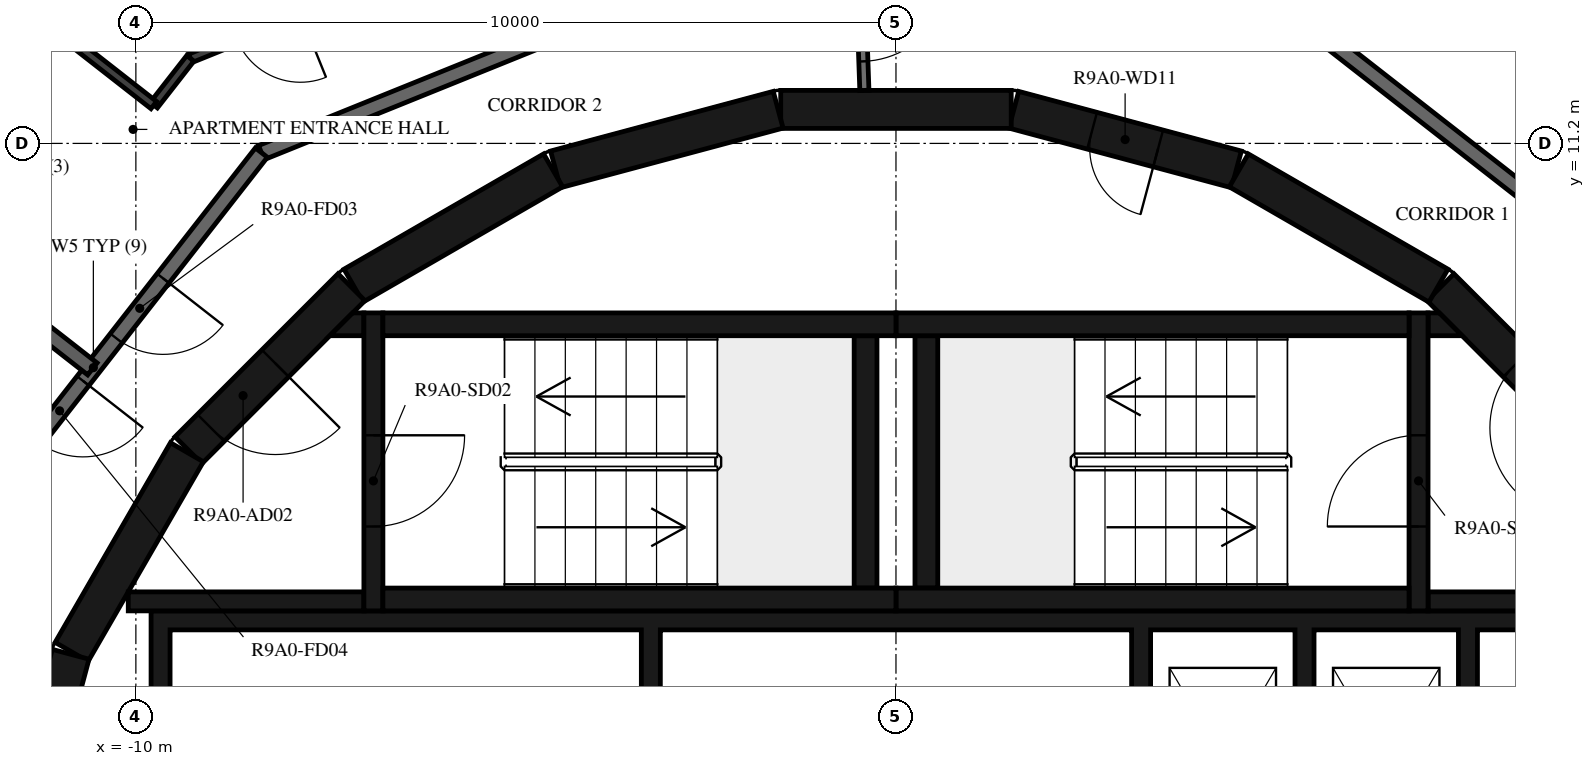
"""IFC4 building model, lengths in metres.
Left out: names, types, materials, properties, quantities, classifications, styles, units other than length and angle.
Written with IfcOpenShell. Run it as: python <this file> out.ifc"""

import sys

from ifc_helpers import new_model, si_unit, direction, frame, frame_2d, origin, place, context, subcontext, project, spatial, polyline, rectangle, outline, extrude, element, fill, save


model = new_model("IFC4")
c1 = context("Model", 3, precision=1e-05, world=origin(), true_north=direction((0.0, 1.0)))
c2 = subcontext(c1, "Body", "Model", "MODEL_VIEW")
j1 = project(units=[si_unit("LENGTHUNIT", "METRE"), si_unit("PLANEANGLEUNIT", "RADIAN")], contexts=[c1])
p1 = place(None, origin())
s1 = spatial("IfcSite", under=j1, at=p1, CompositionType="ELEMENT")
p2 = place(p1, origin())
s2 = spatial("IfcBuilding", under=s1, at=p2, CompositionType="ELEMENT")
p3 = place(p2, frame((0.0, 0.0, 340.0)))
s3 = spatial("IfcBuildingStorey", under=s2, at=p3, CompositionType="ELEMENT", Elevation=340.0)
p4 = place(p3, frame((9.308, 7.164, 0.0), z_axis=(0.0, 0.0, 1.0), x_axis=(-0.707106781187, 0.707106781187, 0.0)))
e1 = element("IfcWall", 1, at=p4, inside=s3, PredefinedType="SHEAR", context=c2, shape_type="SweptSolid", body=[
    extrude(rectangle(XDim=3.032, YDim=0.5, at=frame_2d((1.516, 0.0))), origin(), (0.0, 0.0, 1.0), 3.12),
])
p5 = place(p4, frame((0.416, 0.0, 0.0)))
e2 = element("IfcOpeningElement", 2, at=p5, cuts=e1, PredefinedType="OPENING", context=c2, shape_type="SweptSolid", body=[
    extrude(rectangle(XDim=1.2, YDim=2.1, at=frame_2d((0.6, 1.05))), frame((0.0, 0.26, 0.0), z_axis=(0.0, -1.0, 0.0), x_axis=(1.0, 0.0, 0.0)), (0.0, 0.0, 1.0), 0.52),
])
p6 = place(p3, frame((7.137, 9.329, 0.0), z_axis=(0.0, 0.0, 1.0), x_axis=(-0.865975092491, 0.500087131594, 0.0)))
e3 = element("IfcWall", 3, at=p6, inside=s3, PredefinedType="SHEAR", context=c2, shape_type="SweptSolid", body=[
    extrude(rectangle(XDim=3.033, YDim=0.5, at=frame_2d((1.516, 0.0))), origin(), (0.0, 0.0, 1.0), 3.12),
])
p7 = place(p3, frame((4.479, 10.858, 0.0), z_axis=(0.0, 0.0, 1.0), x_axis=(-0.965948410781, 0.258734743916, 0.0)))
e4 = element("IfcWall", 4, at=p7, inside=s3, PredefinedType="SHEAR", context=c2, shape_type="SweptSolid", body=[
    extrude(rectangle(XDim=3.033, YDim=0.5, at=frame_2d((1.516, 0.0))), origin(), (0.0, 0.0, 1.0), 3.12),
])
p8 = place(p7, frame((1.066, 0.0, 0.0)))
e5 = element("IfcOpeningElement", 5, at=p8, cuts=e4, PredefinedType="OPENING", context=c2, shape_type="SweptSolid", body=[
    extrude(rectangle(XDim=0.9, YDim=2.1, at=frame_2d((0.45, 1.05))), frame((0.0, 0.26, 0.0), z_axis=(0.0, -1.0, 0.0), x_axis=(1.0, 0.0, 0.0)), (0.0, 0.0, 1.0), 0.52),
])
for number, where, z_axis, x_axis in (
    (6, (1.516, 11.647, 0.0), (0.0, 0.0, 1.0), (-1.0, 0.0, 0.0)),
    (7, (-1.55, 11.643, 0.0), (0.0, 0.0, 1.0), (-0.966, -0.259, 0.0)),
    (8, (-4.51, 10.845, 0.0), (0.0, 0.0, 1.0), (-0.866, -0.5, 0.0)),
):
    element("IfcWall", number, at=place(p3, frame(where, z_axis=z_axis, x_axis=x_axis)), inside=s3, PredefinedType="SHEAR", context=c2, shape_type="SweptSolid", body=[
        extrude(rectangle(XDim=3.033, YDim=0.5, at=frame_2d((1.516, 0.0))), origin(), (0.0, 0.0, 1.0), 3.12),
    ])
p9 = place(p3, frame((-7.164, 9.308, 0.0), z_axis=(0.0, 0.0, 1.0), x_axis=(-0.707106781187, -0.707106781187, 0.0)))
e9 = element("IfcWall", 9, at=p9, inside=s3, PredefinedType="SHEAR", context=c2, shape_type="SweptSolid", body=[
    extrude(rectangle(XDim=3.032, YDim=0.5, at=frame_2d((1.516, 0.0))), origin(), (0.0, 0.0, 1.0), 3.12),
])
p10 = place(p9, frame((1.416, 0.0, 0.0)))
e10 = element("IfcOpeningElement", 10, at=p10, cuts=e9, PredefinedType="OPENING", context=c2, shape_type="SweptSolid", body=[
    extrude(rectangle(XDim=1.2, YDim=2.1, at=frame_2d((0.6, 1.05))), frame((0.0, 0.26, 0.0), z_axis=(0.0, -1.0, 0.0), x_axis=(1.0, 0.0, 0.0)), (0.0, 0.0, 1.0), 0.52),
])
for number, where, z_axis, x_axis in (
    (11, (-9.329, 7.137, 0.0), (0.0, 0.0, 1.0), (-0.5, -0.866, 0.0)),
    (12, (-10.858, 4.479, 0.0), (0.0, 0.0, 1.0), (-0.259, -0.966, 0.0)),
):
    element("IfcWall", number, at=place(p3, frame(where, z_axis=z_axis, x_axis=x_axis)), inside=s3, PredefinedType="SHEAR", context=c2, shape_type="SweptSolid", body=[
        extrude(rectangle(XDim=3.033, YDim=0.5, at=frame_2d((1.516, 0.0))), origin(), (0.0, 0.0, 1.0), 3.12),
    ])
for number, where, z_axis, x_axis in (
    (13, (0.0, 5.2, 0.0), (0.0, 0.0, 1.0), (1.0, 0.0, 0.0)),
    (14, (0.0, 8.82, 0.0), (0.0, 0.0, 1.0), (1.0, 0.0, 0.0)),
):
    element("IfcWall", number, at=place(p3, frame(where, z_axis=z_axis, x_axis=x_axis)), inside=s3, PredefinedType="SHEAR", context=c2, shape_type="SweptSolid", body=[
        extrude(rectangle(XDim=6.75, YDim=0.3, at=frame_2d((3.375, 0.0))), origin(), (0.0, 0.0, 1.0), 3.12),
    ])
p11 = place(p3, frame((0.4, 5.35, 0.0), z_axis=(0.0, 0.0, 1.0), x_axis=(0.0, 1.0, 0.0)))
e15 = element("IfcWall", 15, at=p11, inside=s3, PredefinedType="SHEAR", context=c2, shape_type="SweptSolid", body=[
    extrude(rectangle(XDim=3.32, YDim=0.3, at=frame_2d((1.66, 0.0))), origin(), (0.0, 0.0, 1.0), 3.12),
])
p12 = place(p3, frame((6.875, 5.05, 0.0), z_axis=(0.0, 0.0, 1.0), x_axis=(0.0, 1.0, 0.0)))
e16 = element("IfcWall", 16, at=p12, inside=s3, PredefinedType="SHEAR", context=c2, shape_type="SweptSolid", body=[
    extrude(rectangle(XDim=3.92, YDim=0.25, at=frame_2d((1.96, 0.0))), origin(), (0.0, 0.0, 1.0), 3.12),
])
p13 = place(p12, frame((1.11, 0.0, 0.0)))
e17 = element("IfcOpeningElement", 17, at=p13, cuts=e16, PredefinedType="OPENING", context=c2, shape_type="SweptSolid", body=[
    extrude(rectangle(XDim=1.2, YDim=2.1, at=frame_2d((0.6, 1.05))), frame((0.0, 0.135, 0.0), z_axis=(0.0, -1.0, 0.0), x_axis=(1.0, 0.0, 0.0)), (0.0, 0.0, 1.0), 0.27),
])
p14 = place(p3, frame((7.0, 5.175, 0.0), z_axis=(0.0, 0.0, 1.0), x_axis=(1.0, 0.0, 0.0)))
e18 = element("IfcWall", 18, at=p14, inside=s3, PredefinedType="SHEAR", context=c2, shape_type="SweptSolid", body=[
    extrude(rectangle(XDim=3.1, YDim=0.25, at=frame_2d((1.55, 0.0))), origin(), (0.0, 0.0, 1.0), 3.12),
])
p15 = place(p3, origin())
e19 = element("IfcWall", 19, at=p15, inside=s3, PredefinedType="SHEAR", context=c2, shape_type="SweptSolid", body=[
    extrude(outline(polyline([(7.448, 8.67), (7.0, 8.67), (7.0, 8.97), (7.148, 8.97), (7.448, 8.67)])), origin(), (0.0, 0.0, 1.0), 3.12),
])
for number, where, z_axis, x_axis in (
    (20, (-6.75, 5.2, 0.0), (0.0, 0.0, 1.0), (1.0, 0.0, 0.0)),
    (21, (-6.75, 8.82, 0.0), (0.0, 0.0, 1.0), (1.0, 0.0, 0.0)),
):
    element("IfcWall", number, at=place(p3, frame(where, z_axis=z_axis, x_axis=x_axis)), inside=s3, PredefinedType="SHEAR", context=c2, shape_type="SweptSolid", body=[
        extrude(rectangle(XDim=6.75, YDim=0.3, at=frame_2d((3.375, 0.0))), origin(), (0.0, 0.0, 1.0), 3.12),
    ])
p16 = place(p3, frame((-0.4, 5.35, 0.0), z_axis=(0.0, 0.0, 1.0), x_axis=(0.0, 1.0, 0.0)))
e22 = element("IfcWall", 22, at=p16, inside=s3, PredefinedType="SHEAR", context=c2, shape_type="SweptSolid", body=[
    extrude(rectangle(XDim=3.32, YDim=0.3, at=frame_2d((1.66, 0.0))), origin(), (0.0, 0.0, 1.0), 3.12),
])
p17 = place(p3, frame((-6.875, 8.97, 0.0), z_axis=(0.0, 0.0, 1.0), x_axis=(0.0, -1.0, 0.0)))
e23 = element("IfcWall", 23, at=p17, inside=s3, PredefinedType="SHEAR", context=c2, shape_type="SweptSolid", body=[
    extrude(rectangle(XDim=3.92, YDim=0.25, at=frame_2d((1.96, 0.0))), origin(), (0.0, 0.0, 1.0), 3.12),
])
p18 = place(p17, frame((1.61, 0.0, 0.0)))
e24 = element("IfcOpeningElement", 24, at=p18, cuts=e23, PredefinedType="OPENING", context=c2, shape_type="SweptSolid", body=[
    extrude(rectangle(XDim=1.2, YDim=2.1, at=frame_2d((0.6, 1.05))), frame((0.0, 0.135, 0.0), z_axis=(0.0, -1.0, 0.0), x_axis=(1.0, 0.0, 0.0)), (0.0, 0.0, 1.0), 0.27),
])
p19 = place(p3, frame((-7.0, 5.175, 0.0), z_axis=(0.0, 0.0, 1.0), x_axis=(-1.0, 0.0, 0.0)))
e25 = element("IfcWall", 25, at=p19, inside=s3, PredefinedType="SHEAR", context=c2, shape_type="SweptSolid", body=[
    extrude(rectangle(XDim=3.1, YDim=0.25, at=frame_2d((1.55, 0.0))), origin(), (0.0, 0.0, 1.0), 3.12),
])
p20 = place(p3, origin())
e26 = element("IfcWall", 26, at=p20, inside=s3, PredefinedType="SHEAR", context=c2, shape_type="SweptSolid", body=[
    extrude(outline(polyline([(-7.148, 8.97), (-7.0, 8.97), (-7.0, 8.67), (-7.448, 8.67), (-7.148, 8.97)])), origin(), (0.0, 0.0, 1.0), 3.12),
])
p21 = place(p3, origin())
e27 = element("IfcWall", 27, at=p21, inside=s3, PredefinedType="SHEAR", context=c2, shape_type="SweptSolid", body=[
    extrude(outline(polyline([(-9.8, 1.9), (-9.55, 1.9), (-9.55, 4.8), (-3.35, 4.8), (-3.35, 1.9), (-3.1, 1.9), (-3.1, 4.8), (3.1, 4.8), (3.1, 1.9), (3.35, 1.9), (3.35, 4.8), (5.25, 4.8), (5.25, 1.9), (5.5, 1.9), (5.5, 4.8), (7.4, 4.8), (7.4, 1.9), (7.65, 1.9), (7.65, 4.8), (9.55, 4.8), (9.55, 1.9), (9.8, 1.9), (9.8, 4.8), (9.8, 5.05), (-9.8, 5.05), (-9.8, 4.8), (-9.8, 1.9)])), origin(), (0.0, 0.0, 1.0), 3.12),
])
p22 = place(p3, frame((-0.475, 13.598, 0.0), z_axis=(0.0, 0.0, 1.0), x_axis=(0.034852521429, -0.999392466326, 0.0)))
e28 = element("IfcWall", 28, at=p22, inside=s3, PredefinedType="PARTITIONING", context=c2, shape_type="SweptSolid", body=[
    extrude(rectangle(XDim=1.702, YDim=0.12, at=frame_2d((0.851, 0.0))), origin(), (0.0, 0.0, 1.0), 3.12),
])
p23 = place(p22, frame((0.12, 0.0, 0.0)))
e29 = element("IfcOpeningElement", 29, at=p23, cuts=e28, PredefinedType="OPENING", context=c2, shape_type="SweptSolid", body=[
    extrude(rectangle(XDim=1.2, YDim=2.1, at=frame_2d((0.6, 1.05))), frame((0.0, 0.07, 0.0), z_axis=(0.0, -1.0, 0.0), x_axis=(1.0, 0.0, 0.0)), (0.0, 0.0, 1.0), 0.14),
])
p24 = place(p3, frame((11.079, 8.349, 0.0), z_axis=(0.0, 0.0, 1.0), x_axis=(-0.78800478687, 0.615669112324, 0.0)))
e30 = element("IfcWall", 30, at=p24, inside=s3, PredefinedType="STANDARD", context=c2, shape_type="SweptSolid", body=[
    extrude(rectangle(XDim=7.181, YDim=0.2, at=frame_2d((3.591, 0.0))), origin(), (0.0, 0.0, 1.0), 3.12),
])
p25 = place(p24, frame((1.0, 0.0, 0.0)))
e31 = element("IfcOpeningElement", 31, at=p25, cuts=e30, PredefinedType="OPENING", context=c2, shape_type="SweptSolid", body=[
    extrude(rectangle(XDim=1.0, YDim=2.1, at=frame_2d((0.5, 1.05))), frame((0.0, 0.11, 0.0), z_axis=(0.0, -1.0, 0.0), x_axis=(1.0, 0.0, 0.0)), (0.0, 0.0, 1.0), 0.22),
])
p26 = place(p3, frame((-1.691, 13.769, 0.0), z_axis=(0.0, 0.0, 1.0), x_axis=(-0.92717916932, -0.374618189599, 0.0)))
e32 = element("IfcWall", 32, at=p26, inside=s3, PredefinedType="STANDARD", context=c2, shape_type="SweptSolid", body=[
    extrude(rectangle(XDim=7.181, YDim=0.2, at=frame_2d((3.591, 0.0))), origin(), (0.0, 0.0, 1.0), 3.12),
])
p27 = place(p3, frame((-8.349, 11.079, 0.0), z_axis=(0.0, 0.0, 1.0), x_axis=(-0.615669112324, -0.78800478687, 0.0)))
e33 = element("IfcWall", 33, at=p27, inside=s3, PredefinedType="STANDARD", context=c2, shape_type="SweptSolid", body=[
    extrude(rectangle(XDim=7.181, YDim=0.2, at=frame_2d((3.591, 0.0))), origin(), (0.0, 0.0, 1.0), 3.12),
])
p28 = place(p27, frame((2.1, 0.0, 0.0)))
e34 = element("IfcOpeningElement", 34, at=p28, cuts=e33, PredefinedType="OPENING", context=c2, shape_type="SweptSolid", body=[
    extrude(rectangle(XDim=1.0, YDim=2.1, at=frame_2d((0.5, 1.05))), frame((0.0, 0.11, 0.0), z_axis=(0.0, -1.0, 0.0), x_axis=(1.0, 0.0, 0.0)), (0.0, 0.0, 1.0), 0.22),
])
p29 = place(p27, frame((3.811, 0.0, 0.0)))
e35 = element("IfcOpeningElement", 35, at=p29, cuts=e33, PredefinedType="OPENING", context=c2, shape_type="SweptSolid", body=[
    extrude(rectangle(XDim=1.0, YDim=2.1, at=frame_2d((0.5, 1.05))), frame((0.0, 0.11, 0.0), z_axis=(0.0, -1.0, 0.0), x_axis=(1.0, 0.0, 0.0)), (0.0, 0.0, 1.0), 0.22),
])
p30 = place(p3, frame((-12.479, 9.723, 0.0), z_axis=(0.0, 0.0, 1.0), x_axis=(0.788030490991, -0.615636211792, 0.0)))
e36 = element("IfcWall", 36, at=p30, inside=s3, PredefinedType="STANDARD", context=c2, shape_type="SweptSolid", body=[
    extrude(rectangle(XDim=2.42, YDim=0.2, at=frame_2d((1.21, 0.0))), origin(), (0.0, 0.0, 1.0), 3.12),
])
p31 = place(p3, frame((12.319, 9.283, 0.0), z_axis=(0.0, 0.0, 1.0), x_axis=(-0.788000268464, 0.61567489546, 0.0)))
e37 = element("IfcWall", 37, at=p31, inside=s3, PredefinedType="PARTITIONING", context=c2, shape_type="SweptSolid", body=[
    extrude(rectangle(XDim=7.985, YDim=0.12, at=frame_2d((3.992, 0.0))), origin(), (0.0, 0.0, 1.0), 3.12),
])
p32 = place(p31, frame((0.2, 0.0, 0.0)))
e38 = element("IfcOpeningElement", 38, at=p32, cuts=e37, PredefinedType="OPENING", context=c2, shape_type="SweptSolid", body=[
    extrude(rectangle(XDim=0.9, YDim=2.1, at=frame_2d((0.45, 1.05))), frame((0.0, 0.07, 0.0), z_axis=(0.0, -1.0, 0.0), x_axis=(1.0, 0.0, 0.0)), (0.0, 0.0, 1.0), 0.14),
])
p33 = place(p3, frame((-1.88, 15.311, 0.0), z_axis=(0.0, 0.0, 1.0), x_axis=(-0.927184866592, -0.374604088557, 0.0)))
e39 = element("IfcWall", 39, at=p33, inside=s3, PredefinedType="PARTITIONING", context=c2, shape_type="SweptSolid", body=[
    extrude(rectangle(XDim=7.985, YDim=0.12, at=frame_2d((3.993, 0.0))), origin(), (0.0, 0.0, 1.0), 3.12),
])
p34 = place(p33, frame((3.262, 0.0, 0.0)))
e40 = element("IfcOpeningElement", 40, at=p34, cuts=e39, PredefinedType="OPENING", context=c2, shape_type="SweptSolid", body=[
    extrude(rectangle(XDim=0.9, YDim=2.1, at=frame_2d((0.45, 1.05))), frame((0.0, 0.07, 0.0), z_axis=(0.0, -1.0, 0.0), x_axis=(1.0, 0.0, 0.0)), (0.0, 0.0, 1.0), 0.14),
])
p35 = place(p33, frame((6.423, 0.0, 0.0)))
e41 = element("IfcOpeningElement", 41, at=p35, cuts=e39, PredefinedType="OPENING", context=c2, shape_type="SweptSolid", body=[
    extrude(rectangle(XDim=0.9, YDim=2.1, at=frame_2d((0.45, 1.05))), frame((0.0, 0.07, 0.0), z_axis=(0.0, -1.0, 0.0), x_axis=(1.0, 0.0, 0.0)), (0.0, 0.0, 1.0), 0.14),
])
p36 = place(p3, frame((-9.283, 12.319, 0.0), z_axis=(0.0, 0.0, 1.0), x_axis=(-0.615735018346, -0.787953289975, 0.0)))
e42 = element("IfcWall", 42, at=p36, inside=s3, PredefinedType="PARTITIONING", context=c2, shape_type="SweptSolid", body=[
    extrude(rectangle(XDim=0.781, YDim=0.12, at=frame_2d((0.391, 0.0))), origin(), (0.0, 0.0, 1.0), 3.12),
])
p37 = place(p3, frame((-9.764, 11.704, 0.0), z_axis=(0.0, 0.0, 1.0), x_axis=(-0.787996873396, 0.615679240772, 0.0)))
e43 = element("IfcWall", 43, at=p37, inside=s3, PredefinedType="PARTITIONING", context=c2, shape_type="SweptSolid", body=[
    extrude(rectangle(XDim=2.826, YDim=0.12, at=frame_2d((1.413, 0.0))), origin(), (0.0, 0.0, 1.0), 3.12),
])
p38 = place(p13, origin())
e44 = element("IfcDoor", 44, at=p38, inside=s3, OperationType="SINGLE_SWING_LEFT", PredefinedType="DOOR", context=c2, shape_type="SweptSolid", body=[
    extrude(rectangle(XDim=1.2, YDim=2.1, at=frame_2d((0.6, 1.05))), frame((0.0, 0.025, 0.0), z_axis=(0.0, -1.0, 0.0), x_axis=(1.0, 0.0, 0.0)), (0.0, 0.0, 1.0), 0.05),
])
fill(e17, e44)
p39 = place(p5, origin())
e45 = element("IfcDoor", 45, at=p39, inside=s3, OperationType="SINGLE_SWING_RIGHT", PredefinedType="DOOR", context=c2, shape_type="SweptSolid", body=[
    extrude(rectangle(XDim=1.2, YDim=2.1, at=frame_2d((0.6, 1.05))), frame((0.0, 0.025, 0.0), z_axis=(0.0, -1.0, 0.0), x_axis=(1.0, 0.0, 0.0)), (0.0, 0.0, 1.0), 0.05),
])
fill(e2, e45)
p40 = place(p18, origin())
e46 = element("IfcDoor", 46, at=p40, inside=s3, OperationType="SINGLE_SWING_LEFT", PredefinedType="DOOR", context=c2, shape_type="SweptSolid", body=[
    extrude(rectangle(XDim=1.2, YDim=2.1, at=frame_2d((0.6, 1.05))), frame((0.0, 0.025, 0.0), z_axis=(0.0, -1.0, 0.0), x_axis=(1.0, 0.0, 0.0)), (0.0, 0.0, 1.0), 0.05),
])
fill(e24, e46)
p41 = place(p10, origin())
e47 = element("IfcDoor", 47, at=p41, inside=s3, OperationType="SINGLE_SWING_RIGHT", PredefinedType="DOOR", context=c2, shape_type="SweptSolid", body=[
    extrude(rectangle(XDim=1.2, YDim=2.1, at=frame_2d((0.6, 1.05))), frame((0.0, 0.025, 0.0), z_axis=(0.0, -1.0, 0.0), x_axis=(1.0, 0.0, 0.0)), (0.0, 0.0, 1.0), 0.05),
])
fill(e10, e47)
p42 = place(p8, origin())
e48 = element("IfcDoor", 48, at=p42, inside=s3, OperationType="SINGLE_SWING_LEFT", PredefinedType="DOOR", context=c2, shape_type="SweptSolid", body=[
    extrude(rectangle(XDim=0.9, YDim=2.1, at=frame_2d((0.45, 1.05))), frame((0.0, 0.025, 0.0), z_axis=(0.0, -1.0, 0.0), x_axis=(1.0, 0.0, 0.0)), (0.0, 0.0, 1.0), 0.05),
])
fill(e5, e48)
p43 = place(p28, origin())
e49 = element("IfcDoor", 49, at=p43, inside=s3, OperationType="SINGLE_SWING_RIGHT", PredefinedType="DOOR", context=c2, shape_type="SweptSolid", body=[
    extrude(rectangle(XDim=1.0, YDim=2.1, at=frame_2d((0.5, 1.05))), frame((0.0, 0.025, 0.0), z_axis=(0.0, -1.0, 0.0), x_axis=(1.0, 0.0, 0.0)), (0.0, 0.0, 1.0), 0.05),
])
fill(e34, e49)
p44 = place(p29, origin())
e50 = element("IfcDoor", 50, at=p44, inside=s3, OperationType="SINGLE_SWING_LEFT", PredefinedType="DOOR", context=c2, shape_type="SweptSolid", body=[
    extrude(rectangle(XDim=1.0, YDim=2.1, at=frame_2d((0.5, 1.05))), frame((0.0, 0.025, 0.0), z_axis=(0.0, -1.0, 0.0), x_axis=(1.0, 0.0, 0.0)), (0.0, 0.0, 1.0), 0.05),
])
fill(e35, e50)
p45 = place(p23, origin())
e51 = element("IfcDoor", 51, at=p45, inside=s3, OperationType="DOUBLE_DOOR_SINGLE_SWING", PredefinedType="DOOR", context=c2, shape_type="SweptSolid", body=[
    extrude(rectangle(XDim=1.2, YDim=2.1, at=frame_2d((0.6, 1.05))), frame((0.0, 0.025, 0.0), z_axis=(0.0, -1.0, 0.0), x_axis=(1.0, 0.0, 0.0)), (0.0, 0.0, 1.0), 0.05),
])
fill(e29, e51)
save(model, sys.argv[1])
